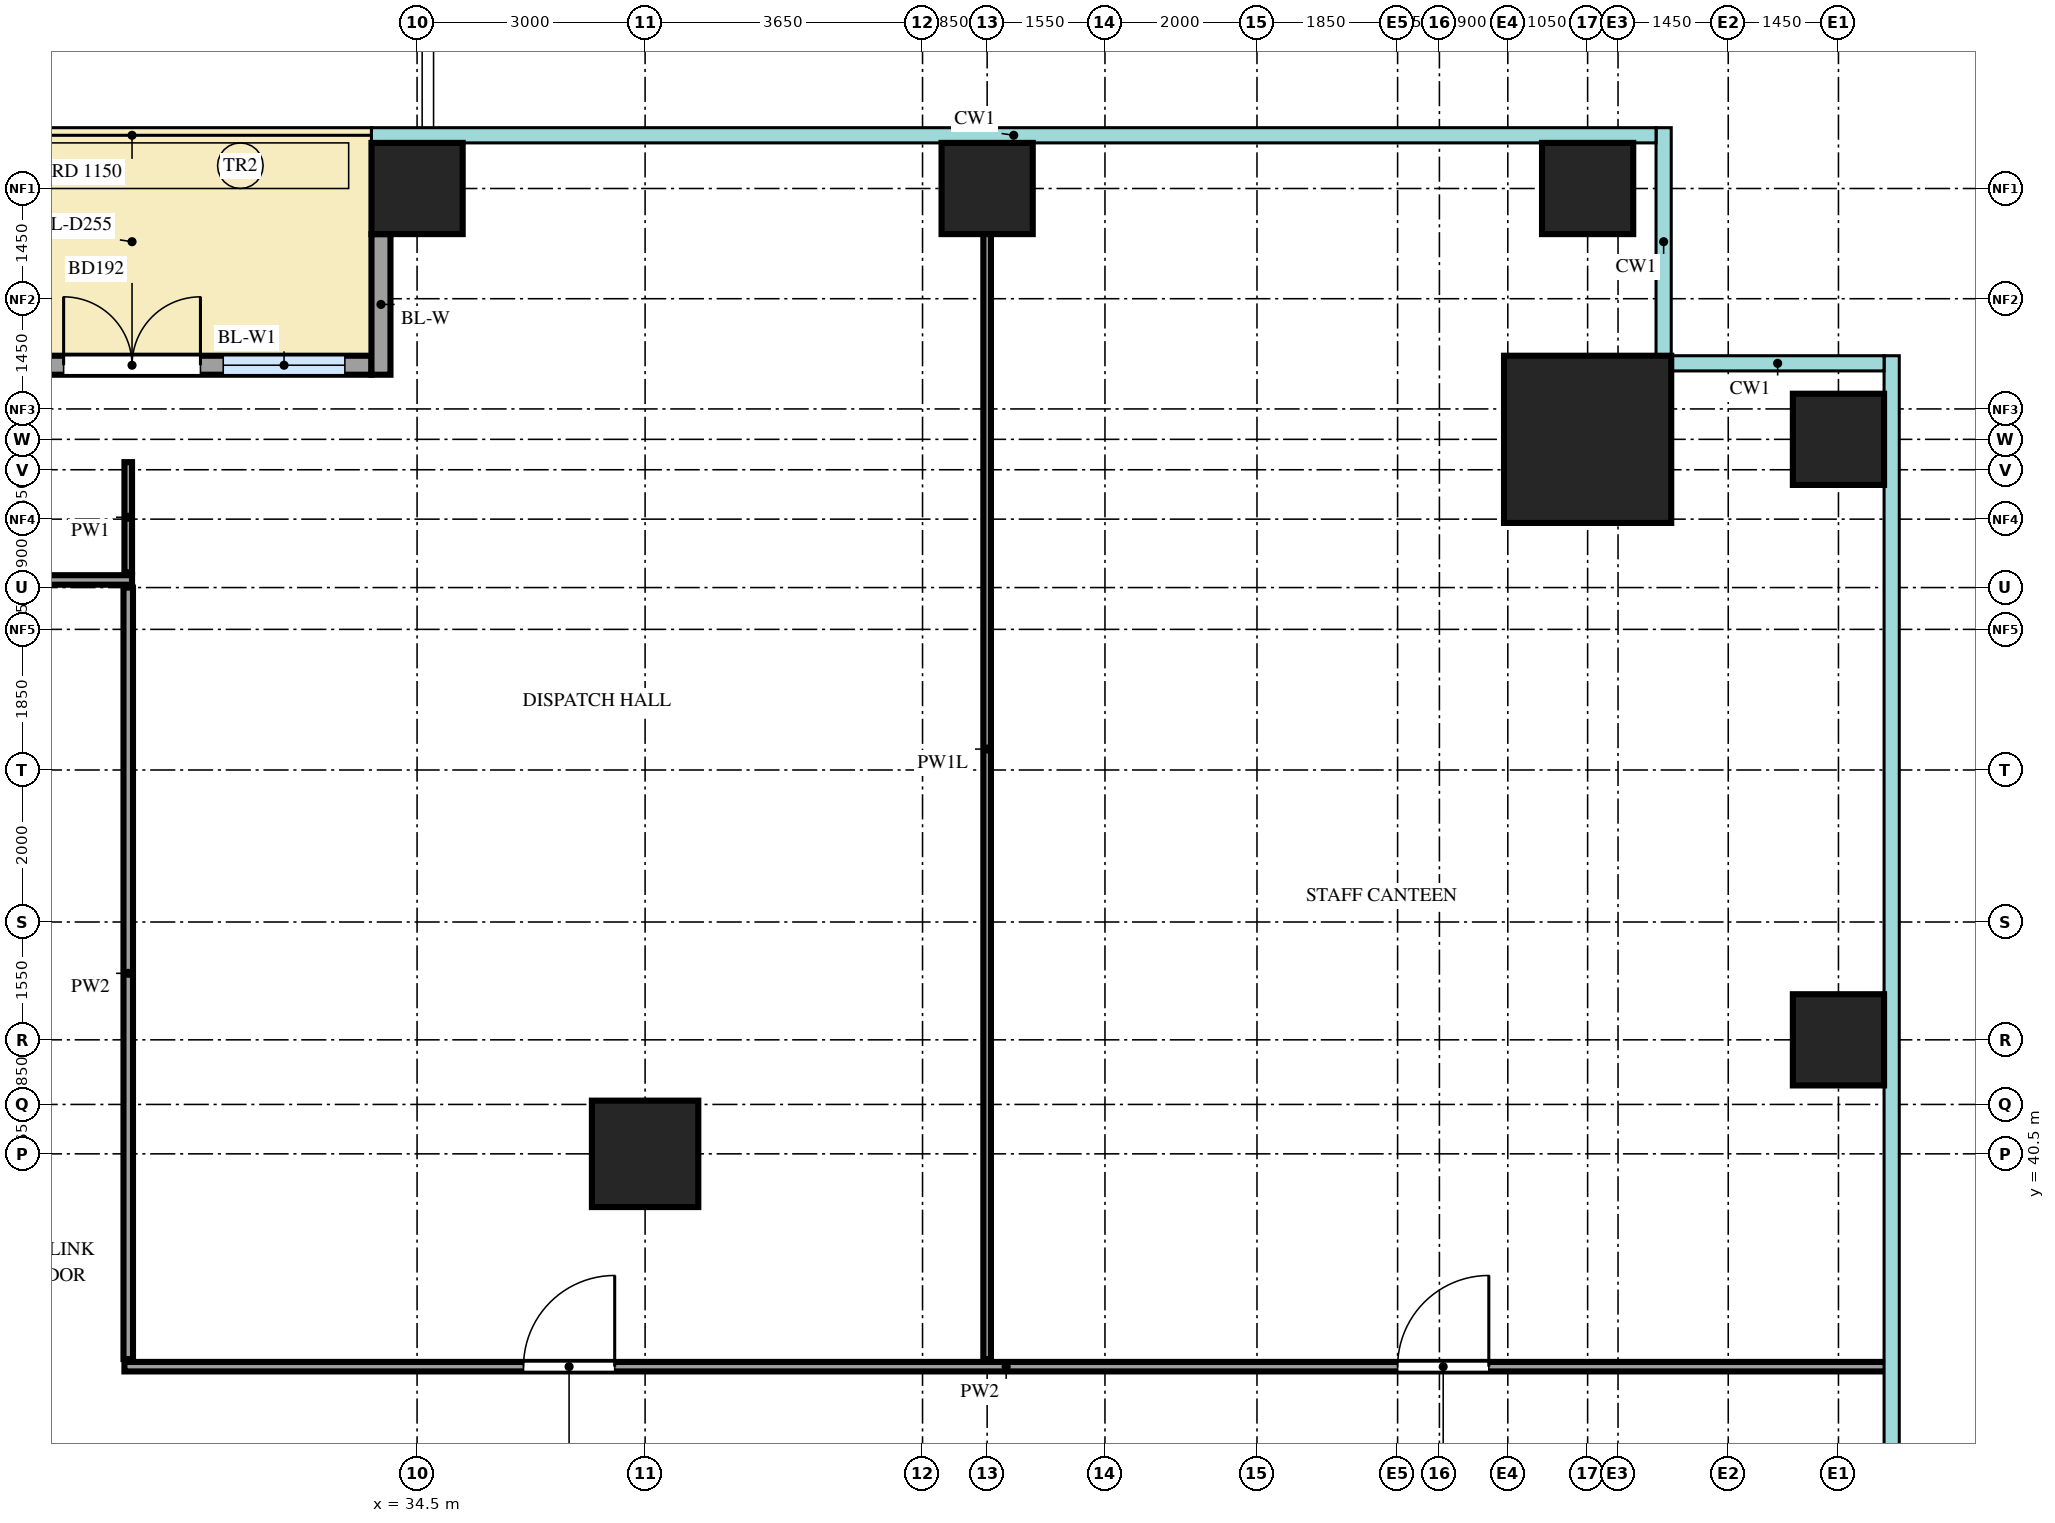
"""IFC4 building model, lengths in metres.
Left out: names, types, materials, properties, quantities, classifications, styles, units other than length and angle.
Written with IfcOpenShell. Run it as: python <this file> out.ifc"""

import sys

from ifc_helpers import new_model, si_unit, direction, frame, frame_2d, origin, origin_2d, place, context, subcontext, project, spatial, rectangle, extrude, source, transform, mapped, element, fill, save


model = new_model("IFC4")
c1 = context("Model", 3, precision=1e-05, world=origin(), true_north=direction((0.0, 1.0)))
c2 = subcontext(c1, "Body", "Model", "MODEL_VIEW")
j1 = project(units=[si_unit("LENGTHUNIT", "METRE"), si_unit("PLANEANGLEUNIT", "RADIAN")], contexts=[c1])
p1 = place(None, origin())
s1 = spatial("IfcSite", under=j1, at=p1, CompositionType="ELEMENT")
p2 = place(p1, origin())
s2 = spatial("IfcBuilding", under=s1, at=p2, CompositionType="ELEMENT")
p3 = place(p2, frame((0.0, 0.0, 91.5)))
s3 = spatial("IfcBuildingStorey", under=s2, at=p3, CompositionType="ELEMENT", Elevation=91.5)
m1 = source(origin(), c2, "Body", "SweptSolid", [
    extrude(rectangle(XDim=2.2, YDim=2.2, at=origin_2d()), origin(), (0.0, 0.0, 1.0), 4.5),
])
p4 = place(p3, frame((49.9, 49.9, 0.0), z_axis=(0.0, 0.0, 1.0), x_axis=(1.0, 0.0, 0.0)))
e1 = element("IfcColumn", 1, at=p4, inside=s3, PredefinedType="COLUMN", context=c2, shape_type="MappedRepresentation", body=[
    mapped(m1, transform((0.0, 0.0, 0.0))),
])
m2 = source(origin(), c2, "Body", "SweptSolid", [
    extrude(rectangle(XDim=1.2, YDim=1.2, at=origin_2d()), origin(), (0.0, 0.0, 1.0), 4.5),
])
for number, where, z_axis, x_axis in (
    (2, (53.2, 42.0, 0.0), (0.0, 0.0, 1.0), (1.0, 0.0, 0.0)),
    (3, (53.2, 49.9, 0.0), (0.0, 0.0, 1.0), (1.0, 0.0, 0.0)),
    (4, (34.5, 53.2, 0.0), (0.0, 0.0, 1.0), (1.0, 0.0, 0.0)),
    (5, (42.0, 53.2, 0.0), (0.0, 0.0, 1.0), (1.0, 0.0, 0.0)),
    (6, (49.9, 53.2, 0.0), (0.0, 0.0, 1.0), (1.0, 0.0, 0.0)),
):
    element("IfcColumn", number, at=place(p3, frame(where, z_axis=z_axis, x_axis=x_axis)), inside=s3, PredefinedType="COLUMN", context=c2, shape_type="MappedRepresentation", body=[
        mapped(m2, transform((0.0, 0.0, 0.0))),
    ])
m3 = source(origin(), c2, "Body", "SweptSolid", [
    extrude(rectangle(XDim=1.4, YDim=1.4, at=origin_2d()), origin(), (0.0, 0.0, 1.0), 4.5),
])
p5 = place(p3, frame((37.5, 40.5, 0.0), z_axis=(0.0, 0.0, 1.0), x_axis=(1.0, 0.0, 0.0)))
e7 = element("IfcColumn", 7, at=p5, inside=s3, PredefinedType="COLUMN", context=c2, shape_type="MappedRepresentation", body=[
    mapped(m3, transform((0.0, 0.0, 0.0))),
])
m4 = source(origin(), c2, "Body", "SweptSolid", [
    extrude(rectangle(XDim=6.3, YDim=0.25, at=frame_2d((3.15, 0.0))), origin(), (0.0, 0.0, 1.0), 4.2),
])
p6 = place(p3, frame((27.6, 50.875, 0.0), z_axis=(0.0, 0.0, 1.0), x_axis=(1.0, 0.0, 0.0)))
e8 = element("IfcWall", 8, at=p6, inside=s3, PredefinedType="SOLIDWALL", context=c2, shape_type="MappedRepresentation", body=[
    mapped(m4, transform((0.0, 0.0, 0.0))),
])
m5 = source(origin(), c2, "Body", "SweptSolid", [
    extrude(rectangle(XDim=1.6, YDim=2.4, at=frame_2d((0.8, 1.2))), frame((0.0, 0.135, 0.0), z_axis=(0.0, -1.0, 0.0), x_axis=(1.0, 0.0, 0.0)), (0.0, 0.0, 1.0), 0.27),
])
p7 = place(p6, frame((0.35, 0.0, 0.0)))
e9 = element("IfcOpeningElement", 9, at=p7, cuts=e8, PredefinedType="OPENING", context=c2, shape_type="MappedRepresentation", body=[
    mapped(m5, transform((0.0, 0.0, 0.0))),
])
p8 = place(p6, frame((4.35, 0.0, 0.0)))
e10 = element("IfcOpeningElement", 10, at=p8, cuts=e8, PredefinedType="OPENING", context=c2, shape_type="MappedRepresentation", body=[
    mapped(m5, transform((0.0, 0.0, 0.0))),
])
m6 = source(origin(), c2, "Body", "SweptSolid", [
    extrude(rectangle(XDim=1.8, YDim=2.4, at=frame_2d((0.9, 1.2))), frame((0.0, 0.135, 0.0), z_axis=(0.0, -1.0, 0.0), x_axis=(1.0, 0.0, 0.0)), (0.0, 0.0, 1.0), 0.27),
])
p9 = place(p6, frame((2.25, 0.0, 0.0)))
e11 = element("IfcOpeningElement", 11, at=p9, cuts=e8, PredefinedType="OPENING", context=c2, shape_type="MappedRepresentation", body=[
    mapped(m6, transform((0.0, 0.0, 0.0))),
])
m7 = source(origin(), c2, "Body", "SweptSolid", [
    extrude(rectangle(XDim=1.85, YDim=0.25, at=frame_2d((0.925, 0.0))), origin(), (0.0, 0.0, 1.0), 4.2),
])
p10 = place(p3, frame((34.025, 52.6, 0.0), z_axis=(0.0, 0.0, 1.0), x_axis=(0.0, -1.0, 0.0)))
e12 = element("IfcWall", 12, at=p10, inside=s3, PredefinedType="SOLIDWALL", context=c2, shape_type="MappedRepresentation", body=[
    mapped(m7, transform((0.0, 0.0, 0.0))),
])
m8 = source(origin(), c2, "Body", "SweptSolid", [
    extrude(rectangle(XDim=23.2, YDim=0.125, at=frame_2d((11.6, 0.0))), origin(), (0.0, 0.0, 1.0), 4.3),
])
p11 = place(p3, frame((30.65, 37.7, 0.0), z_axis=(0.0, 0.0, 1.0), x_axis=(1.0, 0.0, 0.0)))
e13 = element("IfcWall", 13, at=p11, inside=s3, PredefinedType="PARTITIONING", context=c2, shape_type="MappedRepresentation", body=[
    mapped(m8, transform((0.0, 0.0, 0.0))),
])
m9 = source(origin(), c2, "Body", "SweptSolid", [
    extrude(rectangle(XDim=1.2, YDim=2.1, at=frame_2d((0.6, 1.05))), frame((0.0, 0.073, 0.0), z_axis=(0.0, -1.0, 0.0), x_axis=(1.0, 0.0, 0.0)), (0.0, 0.0, 1.0), 0.145),
])
p12 = place(p11, frame((5.25, 0.0, 0.0)))
e14 = element("IfcOpeningElement", 14, at=p12, cuts=e13, PredefinedType="OPENING", context=c2, shape_type="MappedRepresentation", body=[
    mapped(m9, transform((0.0, 0.0, 0.0))),
])
p13 = place(p11, frame((16.75, 0.0, 0.0)))
e15 = element("IfcOpeningElement", 15, at=p13, cuts=e13, PredefinedType="OPENING", context=c2, shape_type="MappedRepresentation", body=[
    mapped(m9, transform((0.0, 0.0, 0.0))),
])
m10 = source(origin(), c2, "Body", "SweptSolid", [
    extrude(rectangle(XDim=10.15, YDim=0.125, at=frame_2d((5.075, 0.0))), origin(), (0.0, 0.0, 1.0), 4.3),
])
p14 = place(p3, frame((30.7, 37.8, 0.0), z_axis=(0.0, 0.0, 1.0), x_axis=(0.0, 1.0, 0.0)))
e16 = element("IfcWall", 16, at=p14, inside=s3, PredefinedType="PARTITIONING", context=c2, shape_type="MappedRepresentation", body=[
    mapped(m10, transform((0.0, 0.0, 0.0))),
])
m11 = source(origin(), c2, "Body", "SweptSolid", [
    extrude(rectangle(XDim=16.05, YDim=0.1, at=frame_2d((8.025, 0.0))), origin(), (0.0, 0.0, 1.0), 3.6),
])
p15 = place(p3, frame((42.0, 37.8, 0.0), z_axis=(0.0, 0.0, 1.0), x_axis=(0.0, 1.0, 0.0)))
e17 = element("IfcWall", 17, at=p15, inside=s3, PredefinedType="PARTITIONING", context=c2, shape_type="MappedRepresentation", body=[
    mapped(m11, transform((0.0, 0.0, 0.0))),
])
m12 = source(origin(), c2, "Body", "SweptSolid", [
    extrude(rectangle(XDim=26.6, YDim=0.125, at=frame_2d((13.3, 0.0))), origin(), (0.0, 0.0, 1.0), 4.3),
])
p16 = place(p3, frame((4.15, 48.05, 0.0), z_axis=(0.0, 0.0, 1.0), x_axis=(1.0, 0.0, 0.0)))
e18 = element("IfcWall", 18, at=p16, inside=s3, PredefinedType="PARTITIONING", context=c2, shape_type="MappedRepresentation", body=[
    mapped(m12, transform((0.0, 0.0, 0.0))),
])
m13 = source(origin(), c2, "Body", "SweptSolid", [
    extrude(rectangle(XDim=0.9, YDim=2.1, at=frame_2d((0.45, 1.05))), frame((0.0, 0.073, 0.0), z_axis=(0.0, -1.0, 0.0), x_axis=(1.0, 0.0, 0.0)), (0.0, 0.0, 1.0), 0.145),
])
p17 = place(p16, frame((7.25, 0.0, 0.0)))
e19 = element("IfcOpeningElement", 19, at=p17, cuts=e18, PredefinedType="OPENING", context=c2, shape_type="MappedRepresentation", body=[
    mapped(m13, transform((0.0, 0.0, 0.0))),
])
p18 = place(p16, frame((20.5, 0.0, 0.0)))
e20 = element("IfcOpeningElement", 20, at=p18, cuts=e18, PredefinedType="OPENING", context=c2, shape_type="MappedRepresentation", body=[
    mapped(m13, transform((0.0, 0.0, 0.0))),
])
m14 = source(origin(), c2, "Body", "SweptSolid", [
    extrude(rectangle(XDim=1.45, YDim=0.1, at=frame_2d((0.725, 0.0))), origin(), (0.0, 0.0, 1.0), 4.3),
])
p19 = place(p3, frame((30.7, 48.15, 0.0), z_axis=(0.0, 0.0, 1.0), x_axis=(0.0, 1.0, 0.0)))
e21 = element("IfcWall", 21, at=p19, inside=s3, PredefinedType="PARTITIONING", context=c2, shape_type="MappedRepresentation", body=[
    mapped(m14, transform((0.0, 0.0, 0.0))),
])
m15 = source(origin(), c2, "Body", "SweptSolid", [
    extrude(rectangle(XDim=1.6, YDim=2.4, at=frame_2d((0.8, 1.2))), frame((0.0, 0.03, 0.0), z_axis=(0.0, -1.0, 0.0), x_axis=(1.0, 0.0, 0.0)), (0.0, 0.0, 1.0), 0.06),
])
p20 = place(p8, origin())
e22 = element("IfcWindow", 22, at=p20, inside=s3, PartitioningType="SINGLE_PANEL", PredefinedType="WINDOW", context=c2, shape_type="MappedRepresentation", body=[
    mapped(m15, transform((0.0, 0.0, 0.0))),
])
fill(e10, e22)
m16 = source(origin(), c2, "Body", "SweptSolid", [
    extrude(rectangle(XDim=1.8, YDim=2.4, at=frame_2d((0.9, 1.2))), frame((0.0, 0.025, 0.0), z_axis=(0.0, -1.0, 0.0), x_axis=(1.0, 0.0, 0.0)), (0.0, 0.0, 1.0), 0.05),
])
p21 = place(p9, origin())
e23 = element("IfcDoor", 23, at=p21, inside=s3, OperationType="DOUBLE_DOOR_DOUBLE_SWING", PredefinedType="DOOR", context=c2, shape_type="MappedRepresentation", body=[
    mapped(m16, transform((0.0, 0.0, 0.0))),
])
fill(e11, e23)
m17 = source(origin(), c2, "Body", "SweptSolid", [
    extrude(rectangle(XDim=1.2, YDim=2.1, at=frame_2d((0.6, 1.05))), frame((0.0, 0.025, 0.0), z_axis=(0.0, -1.0, 0.0), x_axis=(1.0, 0.0, 0.0)), (0.0, 0.0, 1.0), 0.05),
])
p22 = place(p12, origin())
e24 = element("IfcDoor", 24, at=p22, inside=s3, OperationType="SINGLE_SWING_LEFT", PredefinedType="DOOR", context=c2, shape_type="MappedRepresentation", body=[
    mapped(m17, transform((0.0, 0.0, 0.0))),
])
fill(e14, e24)
p23 = place(p13, origin())
e25 = element("IfcDoor", 25, at=p23, inside=s3, OperationType="SINGLE_SWING_LEFT", PredefinedType="DOOR", context=c2, shape_type="MappedRepresentation", body=[
    mapped(m17, transform((0.0, 0.0, 0.0))),
])
fill(e15, e25)
save(model, sys.argv[1])
